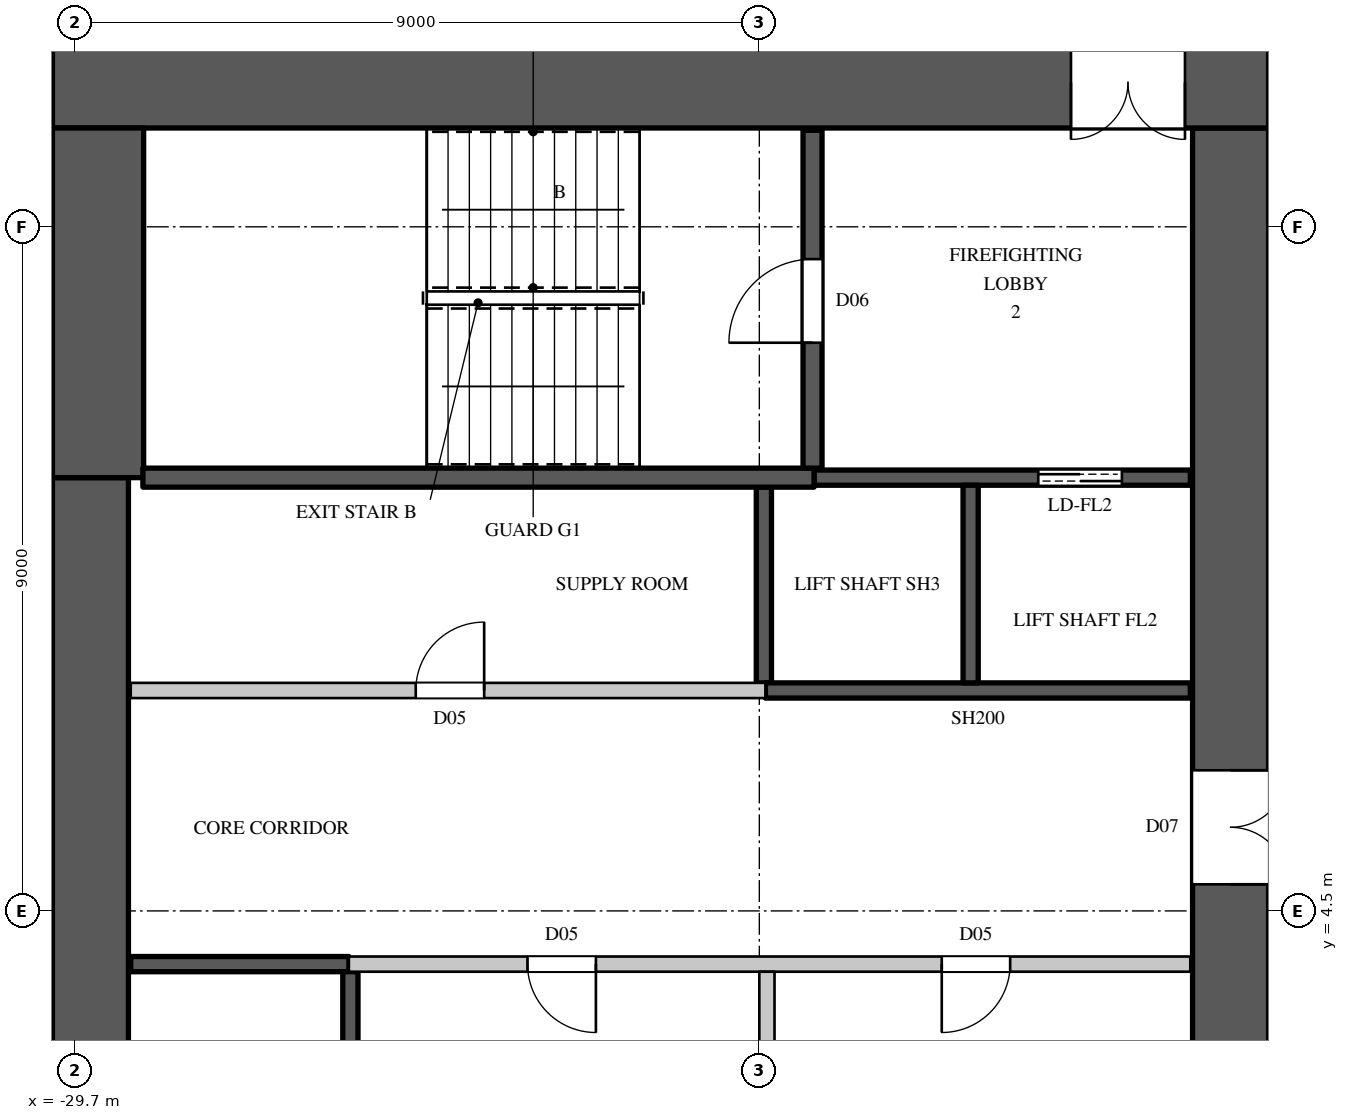
"""IFC4 building model, lengths in metres.
Left out: names, types, materials, properties, quantities, classifications, styles, units other than length and angle.
Written with IfcOpenShell. Run it as: python <this file> out.ifc"""

import sys

from ifc_helpers import new_model, si_unit, direction, frame, frame_2d, origin, place, context, subcontext, project, spatial, rectangle, extrude, element, fill, save


model = new_model("IFC4")
c1 = context("Model", 3, precision=1e-05, world=origin(), true_north=direction((0.0, 1.0)))
c2 = subcontext(c1, "Body", "Model", "MODEL_VIEW")
j1 = project(units=[si_unit("LENGTHUNIT", "METRE"), si_unit("PLANEANGLEUNIT", "RADIAN")], contexts=[c1])
p1 = place(None, origin())
s1 = spatial("IfcSite", under=j1, at=p1, CompositionType="ELEMENT")
p2 = place(p1, origin())
s2 = spatial("IfcBuilding", under=s1, at=p2, CompositionType="ELEMENT")
p3 = place(p2, frame((0.0, 0.0, 138.3)))
s3 = spatial("IfcBuildingStorey", under=s2, at=p3, CompositionType="ELEMENT", Elevation=138.3)
p4 = place(p3, frame((-30.0, 15.4, 0.0), z_axis=(0.0, 0.0, 1.0), x_axis=(1.0, 0.0, 0.0)))
e1 = element("IfcWall", 1, at=p4, inside=s3, PredefinedType="SHEAR", context=c2, shape_type="SweptSolid", body=[
    extrude(rectangle(XDim=16.0, YDim=1.2, at=frame_2d((8.0, 0.0))), origin(), (0.0, 0.0, 1.0), 3.6),
])
p5 = place(p4, frame((13.4, 0.0, 0.0)))
e2 = element("IfcOpeningElement", 2, at=p5, cuts=e1, PredefinedType="OPENING", context=c2, shape_type="SweptSolid", body=[
    extrude(rectangle(XDim=1.5, YDim=2.4, at=frame_2d((0.75, 1.2))), frame((0.0, 0.61, 0.0), z_axis=(0.0, -1.0, 0.0), x_axis=(1.0, 0.0, 0.0)), (0.0, 0.0, 1.0), 1.22),
])
p6 = place(p3, frame((-14.5, -14.8, 0.0), z_axis=(0.0, 0.0, 1.0), x_axis=(0.0, 1.0, 0.0)))
e3 = element("IfcWall", 3, at=p6, inside=s3, PredefinedType="SHEAR", context=c2, shape_type="SweptSolid", body=[
    extrude(rectangle(XDim=29.6, YDim=1.0, at=frame_2d((14.8, 0.0))), origin(), (0.0, 0.0, 1.0), 3.6),
])
p7 = place(p6, frame((8.45, 0.0, 0.0)))
e4 = element("IfcOpeningElement", 4, at=p7, cuts=e3, PredefinedType="OPENING", context=c2, shape_type="SweptSolid", body=[
    extrude(rectangle(XDim=1.5, YDim=2.4, at=frame_2d((0.75, 1.2))), frame((0.0, 0.51, 0.0), z_axis=(0.0, -1.0, 0.0), x_axis=(1.0, 0.0, 0.0)), (0.0, 0.0, 1.0), 1.02),
])
p8 = place(p6, frame((19.65, 0.0, 0.0)))
e5 = element("IfcOpeningElement", 5, at=p8, cuts=e3, PredefinedType="OPENING", context=c2, shape_type="SweptSolid", body=[
    extrude(rectangle(XDim=1.5, YDim=2.4, at=frame_2d((0.75, 1.2))), frame((0.0, 0.51, 0.0), z_axis=(0.0, -1.0, 0.0), x_axis=(1.0, 0.0, 0.0)), (0.0, 0.0, 1.0), 1.02),
])
p9 = place(p6, frame((14.5, 0.0, 0.0)))
e6 = element("IfcOpeningElement", 6, at=p9, cuts=e3, PredefinedType="OPENING", context=c2, shape_type="SweptSolid", body=[
    extrude(rectangle(XDim=0.6, YDim=2.0, at=frame_2d((0.3, 1.0))), frame((0.0, 0.51, 0.0), z_axis=(0.0, -1.0, 0.0), x_axis=(1.0, 0.0, 0.0)), (0.0, 0.0, 1.0), 1.02),
])
p10 = place(p3, frame((-29.5, -10.2, 0.0), z_axis=(0.0, 0.0, 1.0), x_axis=(0.0, 1.0, 0.0)))
e7 = element("IfcWall", 7, at=p10, inside=s3, PredefinedType="SHEAR", context=c2, shape_type="SweptSolid", body=[
    extrude(rectangle(XDim=20.4, YDim=1.0, at=frame_2d((10.2, 0.0))), origin(), (0.0, 0.0, 1.0), 3.6),
])
p11 = place(p3, frame((-29.4, 10.2, 0.0), z_axis=(0.0, 0.0, 1.0), x_axis=(0.0, 1.0, 0.0)))
e8 = element("IfcWall", 8, at=p11, inside=s3, PredefinedType="SHEAR", context=c2, shape_type="SweptSolid", body=[
    extrude(rectangle(XDim=4.6, YDim=1.2, at=frame_2d((2.3, 0.0))), origin(), (0.0, 0.0, 1.0), 3.6),
])
p12 = place(p3, frame((-28.97, 7.4, 0.0), z_axis=(0.0, 0.0, 1.0), x_axis=(1.0, 0.0, 0.0)))
e9 = element("IfcWall", 9, at=p12, inside=s3, PredefinedType="PARTITIONING", context=c2, shape_type="SweptSolid", body=[
    extrude(rectangle(XDim=8.35, YDim=0.2, at=frame_2d((4.175, 0.0))), origin(), (0.0, 0.0, 1.0), 3.3),
])
p13 = place(p12, frame((3.75, 0.0, 0.0)))
e10 = element("IfcOpeningElement", 10, at=p13, cuts=e9, PredefinedType="OPENING", context=c2, shape_type="SweptSolid", body=[
    extrude(rectangle(XDim=0.9, YDim=2.2, at=frame_2d((0.45, 1.1))), frame((0.0, 0.11, 0.0), z_axis=(0.0, -1.0, 0.0), x_axis=(1.0, 0.0, 0.0)), (0.0, 0.0, 1.0), 0.22),
])
p14 = place(p3, frame((-26.1, 3.8, 0.0), z_axis=(0.0, 0.0, 1.0), x_axis=(1.0, 0.0, 0.0)))
e11 = element("IfcWall", 11, at=p14, inside=s3, PredefinedType="PARTITIONING", context=c2, shape_type="SweptSolid", body=[
    extrude(rectangle(XDim=11.07, YDim=0.2, at=frame_2d((5.535, 0.0))), origin(), (0.0, 0.0, 1.0), 3.3),
])
p15 = place(p14, frame((2.35, 0.0, 0.0)))
e12 = element("IfcOpeningElement", 12, at=p15, cuts=e11, PredefinedType="OPENING", context=c2, shape_type="SweptSolid", body=[
    extrude(rectangle(XDim=0.9, YDim=2.2, at=frame_2d((0.45, 1.1))), frame((0.0, 0.11, 0.0), z_axis=(0.0, -1.0, 0.0), x_axis=(1.0, 0.0, 0.0)), (0.0, 0.0, 1.0), 0.22),
])
p16 = place(p14, frame((7.8, 0.0, 0.0)))
e13 = element("IfcOpeningElement", 13, at=p16, cuts=e11, PredefinedType="OPENING", context=c2, shape_type="SweptSolid", body=[
    extrude(rectangle(XDim=0.9, YDim=2.2, at=frame_2d((0.45, 1.1))), frame((0.0, 0.11, 0.0), z_axis=(0.0, -1.0, 0.0), x_axis=(1.0, 0.0, 0.0)), (0.0, 0.0, 1.0), 0.22),
])
p17 = place(p3, frame((-20.6, 1.1, 0.0), z_axis=(0.0, 0.0, 1.0), x_axis=(0.0, 1.0, 0.0)))
e14 = element("IfcWall", 14, at=p17, inside=s3, PredefinedType="PARTITIONING", context=c2, shape_type="SweptSolid", body=[
    extrude(rectangle(XDim=2.6, YDim=0.2, at=frame_2d((1.3, 0.0))), origin(), (0.0, 0.0, 1.0), 2.75),
])
p18 = place(p3, frame((-28.97, 3.8, 0.0), z_axis=(0.0, 0.0, 1.0), x_axis=(1.0, 0.0, 0.0)))
e15 = element("IfcWall", 15, at=p18, inside=s3, PredefinedType="SHEAR", context=c2, shape_type="SweptSolid", body=[
    extrude(rectangle(XDim=2.87, YDim=0.2, at=frame_2d((1.435, 0.0))), origin(), (0.0, 0.0, 1.0), 3.3),
])
p19 = place(p3, frame((-26.08, 1.1, 0.0), z_axis=(0.0, 0.0, 1.0), x_axis=(0.0, 1.0, 0.0)))
e16 = element("IfcWall", 16, at=p19, inside=s3, PredefinedType="SHEAR", context=c2, shape_type="SweptSolid", body=[
    extrude(rectangle(XDim=2.6, YDim=0.2, at=frame_2d((1.3, 0.0))), origin(), (0.0, 0.0, 1.0), 3.3),
])
p20 = place(p3, frame((-20.64, 7.5, 0.0), z_axis=(0.0, 0.0, 1.0), x_axis=(0.0, 1.0, 0.0)))
e17 = element("IfcWall", 17, at=p20, inside=s3, PredefinedType="SHEAR", context=c2, shape_type="SweptSolid", body=[
    extrude(rectangle(XDim=2.575, YDim=0.2, at=frame_2d((1.288, 0.0))), origin(), (0.0, 0.0, 1.0), 3.3),
])
p21 = place(p3, frame((-20.62, 7.4, 0.0), z_axis=(0.0, 0.0, 1.0), x_axis=(1.0, 0.0, 0.0)))
e18 = element("IfcWall", 18, at=p21, inside=s3, PredefinedType="SHEAR", context=c2, shape_type="SweptSolid", body=[
    extrude(rectangle(XDim=5.59, YDim=0.2, at=frame_2d((2.795, 0.0))), origin(), (0.0, 0.0, 1.0), 3.3),
])
p22 = place(p3, frame((-19.98, 10.2, 0.0), z_axis=(0.0, 0.0, 1.0), x_axis=(1.0, 0.0, 0.0)))
e19 = element("IfcWall", 19, at=p22, inside=s3, PredefinedType="SHEAR", context=c2, shape_type="SweptSolid", body=[
    extrude(rectangle(XDim=4.95, YDim=0.2, at=frame_2d((2.475, 0.0))), origin(), (0.0, 0.0, 1.0), 3.3),
])
p23 = place(p22, frame((2.95, 0.0, 0.0)))
e20 = element("IfcOpeningElement", 20, at=p23, cuts=e19, PredefinedType="OPENING", context=c2, shape_type="SweptSolid", body=[
    extrude(rectangle(XDim=1.1, YDim=2.2, at=frame_2d((0.55, 1.1))), frame((0.0, 0.11, 0.0), z_axis=(0.0, -1.0, 0.0), x_axis=(1.0, 0.0, 0.0)), (0.0, 0.0, 1.0), 0.22),
])
p24 = place(p3, frame((-17.92, 7.5, 0.0), z_axis=(0.0, 0.0, 1.0), x_axis=(0.0, 1.0, 0.0)))
e21 = element("IfcWall", 21, at=p24, inside=s3, PredefinedType="SHEAR", context=c2, shape_type="SweptSolid", body=[
    extrude(rectangle(XDim=2.6, YDim=0.2, at=frame_2d((1.3, 0.0))), origin(), (0.0, 0.0, 1.0), 3.6),
])
p25 = place(p3, frame((-28.81, 10.2, 0.0), z_axis=(0.0, 0.0, 1.0), x_axis=(1.0, 0.0, 0.0)))
e22 = element("IfcWall", 22, at=p25, inside=s3, PredefinedType="SHEAR", context=c2, shape_type="SweptSolid", body=[
    extrude(rectangle(XDim=8.83, YDim=0.25, at=frame_2d((4.415, 0.0))), origin(), (0.0, 0.0, 1.0), 3.3),
])
p26 = place(p3, frame((-20.0, 10.325, 0.0), z_axis=(0.0, 0.0, 1.0), x_axis=(0.0, 1.0, 0.0)))
e23 = element("IfcWall", 23, at=p26, inside=s3, PredefinedType="SHEAR", context=c2, shape_type="SweptSolid", body=[
    extrude(rectangle(XDim=4.445, YDim=0.25, at=frame_2d((2.223, 0.0))), origin(), (0.0, 0.0, 1.0), 3.3),
])
p27 = place(p26, frame((1.65, 0.0, 0.0)))
e24 = element("IfcOpeningElement", 24, at=p27, cuts=e23, PredefinedType="OPENING", context=c2, shape_type="SweptSolid", body=[
    extrude(rectangle(XDim=1.1, YDim=2.2, at=frame_2d((0.55, 1.1))), frame((0.0, 0.135, 0.0), z_axis=(0.0, -1.0, 0.0), x_axis=(1.0, 0.0, 0.0)), (0.0, 0.0, 1.0), 0.27),
])
p28 = place(p27, origin())
e25 = element("IfcDoor", 25, at=p28, inside=s3, OperationType="SINGLE_SWING_LEFT", PredefinedType="DOOR", context=c2, shape_type="SweptSolid", body=[
    extrude(rectangle(XDim=1.1, YDim=2.2, at=frame_2d((0.55, 1.1))), frame((0.0, 0.025, 0.0), z_axis=(0.0, -1.0, 0.0), x_axis=(1.0, 0.0, 0.0)), (0.0, 0.0, 1.0), 0.05),
])
fill(e24, e25)
p29 = place(p15, origin())
e26 = element("IfcDoor", 26, at=p29, inside=s3, OperationType="SINGLE_SWING_LEFT", PredefinedType="DOOR", context=c2, shape_type="SweptSolid", body=[
    extrude(rectangle(XDim=0.9, YDim=2.2, at=frame_2d((0.45, 1.1))), frame((0.0, 0.025, 0.0), z_axis=(0.0, -1.0, 0.0), x_axis=(1.0, 0.0, 0.0)), (0.0, 0.0, 1.0), 0.05),
])
fill(e12, e26)
p30 = place(p16, origin())
e27 = element("IfcDoor", 27, at=p30, inside=s3, OperationType="SINGLE_SWING_RIGHT", PredefinedType="DOOR", context=c2, shape_type="SweptSolid", body=[
    extrude(rectangle(XDim=0.9, YDim=2.2, at=frame_2d((0.45, 1.1))), frame((0.0, 0.025, 0.0), z_axis=(0.0, -1.0, 0.0), x_axis=(1.0, 0.0, 0.0)), (0.0, 0.0, 1.0), 0.05),
])
fill(e13, e27)
p31 = place(p13, origin())
e28 = element("IfcDoor", 28, at=p31, inside=s3, OperationType="SINGLE_SWING_RIGHT", PredefinedType="DOOR", context=c2, shape_type="SweptSolid", body=[
    extrude(rectangle(XDim=0.9, YDim=2.2, at=frame_2d((0.45, 1.1))), frame((0.0, 0.025, 0.0), z_axis=(0.0, -1.0, 0.0), x_axis=(1.0, 0.0, 0.0)), (0.0, 0.0, 1.0), 0.05),
])
fill(e10, e28)
p32 = place(p23, origin())
e29 = element("IfcDoor", 29, at=p32, inside=s3, OperationType="DOUBLE_DOOR_SLIDING", PredefinedType="DOOR", context=c2, shape_type="SweptSolid", body=[
    extrude(rectangle(XDim=1.1, YDim=2.2, at=frame_2d((0.55, 1.1))), frame((0.0, 0.025, 0.0), z_axis=(0.0, -1.0, 0.0), x_axis=(1.0, 0.0, 0.0)), (0.0, 0.0, 1.0), 0.05),
])
fill(e20, e29)
p33 = place(p5, origin())
e30 = element("IfcDoor", 30, at=p33, inside=s3, OperationType="DOUBLE_DOOR_SINGLE_SWING", PredefinedType="DOOR", context=c2, shape_type="SweptSolid", body=[
    extrude(rectangle(XDim=1.5, YDim=2.4, at=frame_2d((0.75, 1.2))), frame((0.0, 0.025, 0.0), z_axis=(0.0, -1.0, 0.0), x_axis=(1.0, 0.0, 0.0)), (0.0, 0.0, 1.0), 0.05),
])
fill(e2, e30)
p34 = place(p8, origin())
e31 = element("IfcDoor", 31, at=p34, inside=s3, OperationType="DOUBLE_DOOR_SINGLE_SWING", PredefinedType="DOOR", context=c2, shape_type="SweptSolid", body=[
    extrude(rectangle(XDim=1.5, YDim=2.4, at=frame_2d((0.75, 1.2))), frame((0.0, -0.445, 0.0), z_axis=(0.0, -1.0, 0.0), x_axis=(1.0, 0.0, 0.0)), (0.0, 0.0, 1.0), 0.05),
])
fill(e5, e31)
save(model, sys.argv[1])
